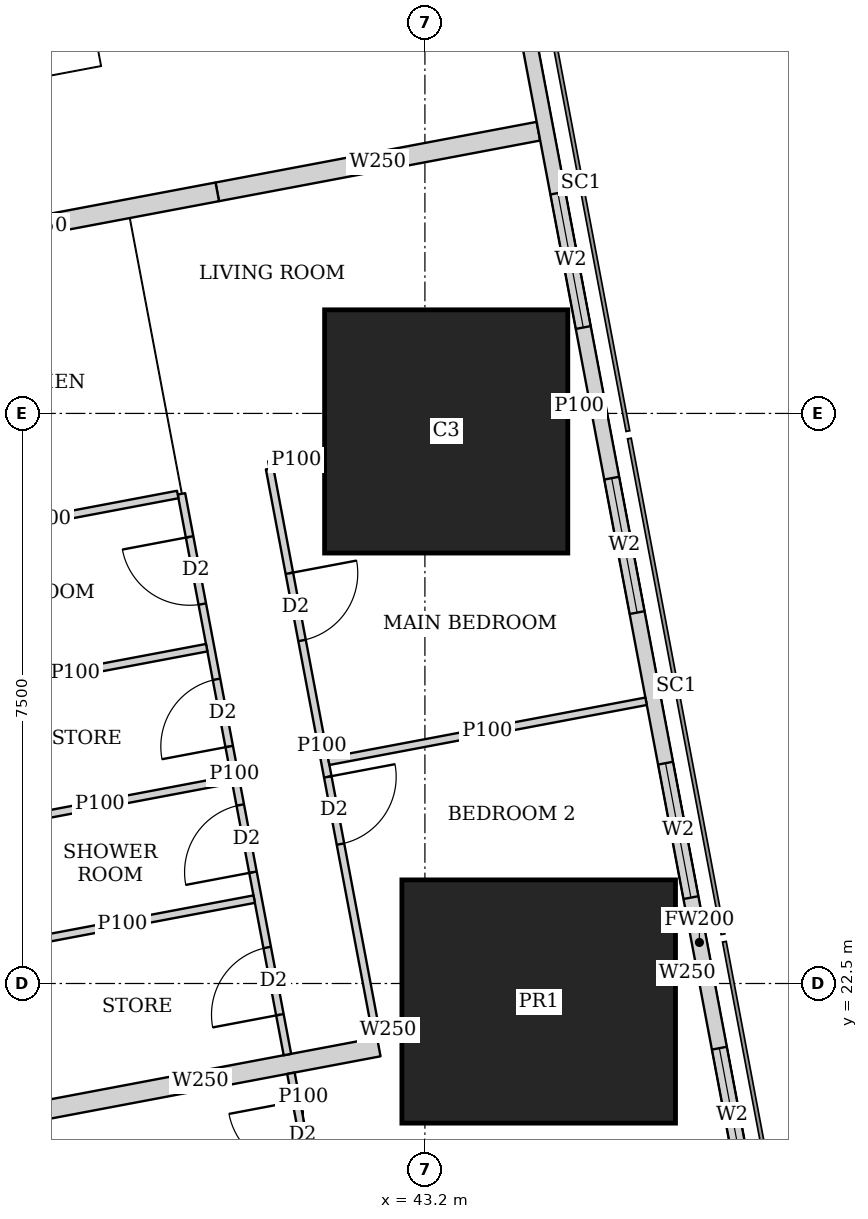
"""IFC4 building model, lengths in metres.
Left out: names, types, materials, properties, quantities, classifications, styles, units other than length and angle.
Written with IfcOpenShell. Run it as: python <this file> out.ifc"""

import sys

from ifc_helpers import new_model, si_unit, direction, frame, frame_2d, origin, origin_2d, place, context, subcontext, project, spatial, rectangle, extrude, element, fill, save


model = new_model("IFC4")
c1 = context("Model", 3, precision=1e-05, world=origin(), true_north=direction((0.0, 1.0)))
c2 = subcontext(c1, "Body", "Model", "MODEL_VIEW")
j1 = project(units=[si_unit("LENGTHUNIT", "METRE"), si_unit("PLANEANGLEUNIT", "RADIAN")], contexts=[c1])
p1 = place(None, origin())
s1 = spatial("IfcSite", under=j1, at=p1, CompositionType="ELEMENT")
p2 = place(p1, origin())
s2 = spatial("IfcBuilding", under=s1, at=p2, CompositionType="ELEMENT")
p3 = place(p2, frame((0.0, 0.0, 20.0)))
s3 = spatial("IfcBuildingStorey", under=s2, at=p3, CompositionType="ELEMENT", Elevation=20.0)
p4 = place(p3, frame((44.697, 22.263, 0.0), z_axis=(0.0, 0.0, 1.0), x_axis=(1.0, 0.0, 0.0)))
e1 = element("IfcColumn", 1, at=p4, inside=s3, PredefinedType="COLUMN", context=c2, shape_type="SweptSolid", body=[
    extrude(rectangle(XDim=3.6, YDim=3.2, at=origin_2d()), origin(), (0.0, 0.0, 1.0), 3.75),
])
p5 = place(p3, frame((43.48, 29.763, 0.0), z_axis=(0.0, 0.0, 1.0), x_axis=(1.0, 0.0, 0.0)))
e2 = element("IfcColumn", 2, at=p5, inside=s3, PredefinedType="COLUMN", context=c2, shape_type="SweptSolid", body=[
    extrude(rectangle(XDim=3.2, YDim=3.2, at=origin_2d()), origin(), (0.0, 0.0, 1.0), 3.75),
])
p6 = place(p3, frame((50.653, 2.703, 0.0), z_axis=(0.0, 0.0, 1.0), x_axis=(-0.185612026696, 0.982623109613, 0.0)))
e3 = element("IfcWall", 3, at=p6, inside=s3, PredefinedType="SOLIDWALL", context=c2, shape_type="SweptSolid", body=[
    extrude(rectangle(XDim=41.393, YDim=0.2, at=frame_2d((20.697, 0.0))), origin(), (0.0, 0.0, 1.0), 3.5),
])
p7 = place(p6, frame((1.633, 0.0, 0.9)))
e4 = element("IfcOpeningElement", 4, at=p7, cuts=e3, PredefinedType="OPENING", context=c2, shape_type="SweptSolid", body=[
    extrude(rectangle(XDim=1.8, YDim=1.5, at=frame_2d((0.9, 0.75))), frame((0.0, 0.11, 0.0), z_axis=(0.0, -1.0, 0.0), x_axis=(1.0, 0.0, 0.0)), (0.0, 0.0, 1.0), 0.22),
])
p8 = place(p6, frame((6.032, 0.0, 0.9)))
e5 = element("IfcOpeningElement", 5, at=p8, cuts=e3, PredefinedType="OPENING", context=c2, shape_type="SweptSolid", body=[
    extrude(rectangle(XDim=1.8, YDim=1.5, at=frame_2d((0.9, 0.75))), frame((0.0, 0.11, 0.0), z_axis=(0.0, -1.0, 0.0), x_axis=(1.0, 0.0, 0.0)), (0.0, 0.0, 1.0), 0.22),
])
p9 = place(p6, frame((9.848, 0.0, 0.9)))
e6 = element("IfcOpeningElement", 6, at=p9, cuts=e3, PredefinedType="OPENING", context=c2, shape_type="SweptSolid", body=[
    extrude(rectangle(XDim=1.8, YDim=1.5, at=frame_2d((0.9, 0.75))), frame((0.0, 0.11, 0.0), z_axis=(0.0, -1.0, 0.0), x_axis=(1.0, 0.0, 0.0)), (0.0, 0.0, 1.0), 0.22),
])
p10 = place(p6, frame((17.481, 0.0, 0.9)))
e7 = element("IfcOpeningElement", 7, at=p10, cuts=e3, PredefinedType="OPENING", context=c2, shape_type="SweptSolid", body=[
    extrude(rectangle(XDim=1.8, YDim=1.5, at=frame_2d((0.9, 0.75))), frame((0.0, 0.11, 0.0), z_axis=(0.0, -1.0, 0.0), x_axis=(1.0, 0.0, 0.0)), (0.0, 0.0, 1.0), 0.22),
])
p11 = place(p6, frame((21.297, 0.0, 0.9)))
e8 = element("IfcOpeningElement", 8, at=p11, cuts=e3, PredefinedType="OPENING", context=c2, shape_type="SweptSolid", body=[
    extrude(rectangle(XDim=1.8, YDim=1.5, at=frame_2d((0.9, 0.75))), frame((0.0, 0.11, 0.0), z_axis=(0.0, -1.0, 0.0), x_axis=(1.0, 0.0, 0.0)), (0.0, 0.0, 1.0), 0.22),
])
p12 = place(p6, frame((25.113, 0.0, 0.9)))
e9 = element("IfcOpeningElement", 9, at=p12, cuts=e3, PredefinedType="OPENING", context=c2, shape_type="SweptSolid", body=[
    extrude(rectangle(XDim=1.8, YDim=1.5, at=frame_2d((0.9, 0.75))), frame((0.0, 0.11, 0.0), z_axis=(0.0, -1.0, 0.0), x_axis=(1.0, 0.0, 0.0)), (0.0, 0.0, 1.0), 0.22),
])
p13 = place(p6, frame((28.93, 0.0, 0.9)))
e10 = element("IfcOpeningElement", 10, at=p13, cuts=e3, PredefinedType="OPENING", context=c2, shape_type="SweptSolid", body=[
    extrude(rectangle(XDim=1.8, YDim=1.5, at=frame_2d((0.9, 0.75))), frame((0.0, 0.11, 0.0), z_axis=(0.0, -1.0, 0.0), x_axis=(1.0, 0.0, 0.0)), (0.0, 0.0, 1.0), 0.22),
])
p14 = place(p6, frame((32.746, 0.0, 0.9)))
e11 = element("IfcOpeningElement", 11, at=p14, cuts=e3, PredefinedType="OPENING", context=c2, shape_type="SweptSolid", body=[
    extrude(rectangle(XDim=1.8, YDim=1.5, at=frame_2d((0.9, 0.75))), frame((0.0, 0.11, 0.0), z_axis=(0.0, -1.0, 0.0), x_axis=(1.0, 0.0, 0.0)), (0.0, 0.0, 1.0), 0.22),
])
p15 = place(p6, frame((36.481, 0.0, 0.9)))
e12 = element("IfcOpeningElement", 12, at=p15, cuts=e3, PredefinedType="OPENING", context=c2, shape_type="SweptSolid", body=[
    extrude(rectangle(XDim=1.8, YDim=1.5, at=frame_2d((0.9, 0.75))), frame((0.0, 0.11, 0.0), z_axis=(0.0, -1.0, 0.0), x_axis=(1.0, 0.0, 0.0)), (0.0, 0.0, 1.0), 0.22),
])
p16 = place(p3, frame((33.755, 42.325, 0.0), z_axis=(0.0, 0.0, 1.0), x_axis=(0.185611461091, -0.982623216453, 0.0)))
e13 = element("IfcWall", 13, at=p16, inside=s3, PredefinedType="SOLIDWALL", context=c2, shape_type="SweptSolid", body=[
    extrude(rectangle(XDim=40.241, YDim=0.15, at=frame_2d((20.121, 0.0))), origin(), (0.0, 0.0, 1.0), 2.5),
])
p17 = place(p16, frame((7.325, 0.0, 0.0)))
e14 = element("IfcOpeningElement", 14, at=p17, cuts=e13, PredefinedType="OPENING", context=c2, shape_type="SweptSolid", body=[
    extrude(rectangle(XDim=1.0, YDim=2.1, at=frame_2d((0.5, 1.05))), frame((0.0, 0.085, 0.0), z_axis=(0.0, -1.0, 0.0), x_axis=(1.0, 0.0, 0.0)), (0.0, 0.0, 1.0), 0.17),
])
p18 = place(p16, frame((11.902, 0.0, 0.0)))
e15 = element("IfcOpeningElement", 15, at=p18, cuts=e13, PredefinedType="OPENING", context=c2, shape_type="SweptSolid", body=[
    extrude(rectangle(XDim=1.0, YDim=2.1, at=frame_2d((0.5, 1.05))), frame((0.0, 0.085, 0.0), z_axis=(0.0, -1.0, 0.0), x_axis=(1.0, 0.0, 0.0)), (0.0, 0.0, 1.0), 0.17),
])
p19 = place(p16, frame((25.718, 0.0, 0.0)))
e16 = element("IfcOpeningElement", 16, at=p19, cuts=e13, PredefinedType="OPENING", context=c2, shape_type="SweptSolid", body=[
    extrude(rectangle(XDim=1.0, YDim=2.1, at=frame_2d((0.5, 1.05))), frame((0.0, 0.085, 0.0), z_axis=(0.0, -1.0, 0.0), x_axis=(1.0, 0.0, 0.0)), (0.0, 0.0, 1.0), 0.17),
])
p20 = place(p16, frame((31.788, 0.0, 0.0)))
e17 = element("IfcOpeningElement", 17, at=p20, cuts=e13, PredefinedType="OPENING", context=c2, shape_type="SweptSolid", body=[
    extrude(rectangle(XDim=1.0, YDim=2.1, at=frame_2d((0.5, 1.05))), frame((0.0, 0.085, 0.0), z_axis=(0.0, -1.0, 0.0), x_axis=(1.0, 0.0, 0.0)), (0.0, 0.0, 1.0), 0.17),
])
p21 = place(p3, frame((41.157, 29.273, 0.0), z_axis=(0.0, 0.0, 1.0), x_axis=(0.18542464283, -0.982658486877, 0.0)))
e18 = element("IfcWall", 18, at=p21, inside=s3, PredefinedType="PARTITIONING", context=c2, shape_type="SweptSolid", body=[
    extrude(rectangle(XDim=7.421, YDim=0.1, at=frame_2d((3.71, 0.0))), origin(), (0.0, 0.0, 1.0), 2.5),
])
p22 = place(p21, frame((1.4, 0.0, 0.0)))
e19 = element("IfcOpeningElement", 19, at=p22, cuts=e18, PredefinedType="OPENING", context=c2, shape_type="SweptSolid", body=[
    extrude(rectangle(XDim=0.9, YDim=2.1, at=frame_2d((0.45, 1.05))), frame((0.0, 0.06, 0.0), z_axis=(0.0, -1.0, 0.0), x_axis=(1.0, 0.0, 0.0)), (0.0, 0.0, 1.0), 0.12),
])
p23 = place(p21, frame((4.126, 0.0, 0.0)))
e20 = element("IfcOpeningElement", 20, at=p23, cuts=e18, PredefinedType="OPENING", context=c2, shape_type="SweptSolid", body=[
    extrude(rectangle(XDim=0.9, YDim=2.1, at=frame_2d((0.45, 1.05))), frame((0.0, 0.06, 0.0), z_axis=(0.0, -1.0, 0.0), x_axis=(1.0, 0.0, 0.0)), (0.0, 0.0, 1.0), 0.12),
])
p24 = place(p3, frame((39.997, 28.942, 0.0), z_axis=(0.0, 0.0, 1.0), x_axis=(0.185686318797, -0.982609073341, 0.0)))
e21 = element("IfcWall", 21, at=p24, inside=s3, PredefinedType="PARTITIONING", context=c2, shape_type="SweptSolid", body=[
    extrude(rectangle(XDim=7.508, YDim=0.1, at=frame_2d((3.754, 0.0))), origin(), (0.0, 0.0, 1.0), 2.5),
])
p25 = place(p24, frame((0.576, 0.0, 0.0)))
e22 = element("IfcOpeningElement", 22, at=p25, cuts=e21, PredefinedType="OPENING", context=c2, shape_type="SweptSolid", body=[
    extrude(rectangle(XDim=0.9, YDim=2.1, at=frame_2d((0.45, 1.05))), frame((0.0, 0.06, 0.0), z_axis=(0.0, -1.0, 0.0), x_axis=(1.0, 0.0, 0.0)), (0.0, 0.0, 1.0), 0.12),
])
p26 = place(p24, frame((4.166, 0.0, 0.0)))
e23 = element("IfcOpeningElement", 23, at=p26, cuts=e21, PredefinedType="OPENING", context=c2, shape_type="SweptSolid", body=[
    extrude(rectangle(XDim=0.9, YDim=2.1, at=frame_2d((0.45, 1.05))), frame((0.0, 0.06, 0.0), z_axis=(0.0, -1.0, 0.0), x_axis=(1.0, 0.0, 0.0)), (0.0, 0.0, 1.0), 0.12),
])
p27 = place(p24, frame((2.483, 0.0, 0.0)))
e24 = element("IfcOpeningElement", 24, at=p27, cuts=e21, PredefinedType="OPENING", context=c2, shape_type="SweptSolid", body=[
    extrude(rectangle(XDim=0.9, YDim=2.1, at=frame_2d((0.45, 1.05))), frame((0.0, 0.06, 0.0), z_axis=(0.0, -1.0, 0.0), x_axis=(1.0, 0.0, 0.0)), (0.0, 0.0, 1.0), 0.12),
])
p28 = place(p24, frame((6.074, 0.0, 0.0)))
e25 = element("IfcOpeningElement", 25, at=p28, cuts=e21, PredefinedType="OPENING", context=c2, shape_type="SweptSolid", body=[
    extrude(rectangle(XDim=0.9, YDim=2.1, at=frame_2d((0.45, 1.05))), frame((0.0, 0.06, 0.0), z_axis=(0.0, -1.0, 0.0), x_axis=(1.0, 0.0, 0.0)), (0.0, 0.0, 1.0), 0.12),
])
p29 = place(p3, frame((45.372, 30.121, 0.0), z_axis=(0.0, 0.0, 1.0), x_axis=(-0.982024635814, -0.188752787143, 0.0)))
e26 = element("IfcWall", 26, at=p29, inside=s3, PredefinedType="PARTITIONING", context=c2, shape_type="SweptSolid", body=[
    extrude(rectangle(XDim=0.287, YDim=0.1, at=frame_2d((0.144, 0.0))), origin(), (0.0, 0.0, 1.0), 3.5),
])
p30 = place(p3, frame((41.87, 29.459, 0.0), z_axis=(0.0, 0.0, 1.0), x_axis=(-0.982532562822, -0.186090738603, 0.0)))
e27 = element("IfcWall", 27, at=p30, inside=s3, PredefinedType="PARTITIONING", context=c2, shape_type="SweptSolid", body=[
    extrude(rectangle(XDim=0.736, YDim=0.1, at=frame_2d((0.368, 0.0))), origin(), (0.0, 0.0, 1.0), 2.5),
])
p31 = place(p3, frame((46.11, 26.213, 0.0), z_axis=(0.0, 0.0, 1.0), x_axis=(-0.982623519589, -0.185609856287, 0.0)))
e28 = element("IfcWall", 28, at=p31, inside=s3, PredefinedType="PARTITIONING", context=c2, shape_type="SweptSolid", body=[
    extrude(rectangle(XDim=4.25, YDim=0.1, at=frame_2d((2.125, 0.0))), origin(), (0.0, 0.0, 1.0), 2.05),
])
for number, where, z_axis, x_axis in (
    (29, (39.948, 28.933, 0.0), (0.0, 0.0, 1.0), (-0.983, -0.186, 0.0)),
    (30, (40.656, 25.183, 0.0), (0.0, 0.0, 1.0), (-0.983, -0.186, 0.0)),
):
    element("IfcWall", number, at=place(p3, frame(where, z_axis=z_axis, x_axis=x_axis)), inside=s3, PredefinedType="PARTITIONING", context=c2, shape_type="SweptSolid", body=[
        extrude(rectangle(XDim=3.524, YDim=0.1, at=frame_2d((1.762, 0.0))), origin(), (0.0, 0.0, 1.0), 3.5),
    ])
p32 = place(p3, frame((40.329, 26.918, 0.0), z_axis=(0.0, 0.0, 1.0), x_axis=(-0.982638553676, -0.185530247748, 0.0)))
e31 = element("IfcWall", 31, at=p32, inside=s3, PredefinedType="PARTITIONING", context=c2, shape_type="SweptSolid", body=[
    extrude(rectangle(XDim=3.525, YDim=0.1, at=frame_2d((1.763, 0.0))), origin(), (0.0, 0.0, 1.0), 3.5),
])
p33 = place(p3, frame((40.954, 23.61, 0.0), z_axis=(0.0, 0.0, 1.0), x_axis=(-0.982638553676, -0.185530247748, 0.0)))
e32 = element("IfcWall", 32, at=p33, inside=s3, PredefinedType="PARTITIONING", context=c2, shape_type="SweptSolid", body=[
    extrude(rectangle(XDim=3.525, YDim=0.1, at=frame_2d((1.763, 0.0))), origin(), (0.0, 0.0, 1.0), 2.5),
])
p34 = place(p3, frame((44.693, 33.713, 0.0), z_axis=(0.0, 0.0, 1.0), x_axis=(-0.982633535512, -0.185556823879, 0.0)))
e33 = element("IfcWall", 33, at=p34, inside=s3, PredefinedType="SOLIDWALL", context=c2, shape_type="SweptSolid", body=[
    extrude(rectangle(XDim=4.3, YDim=0.25, at=frame_2d((2.15, 0.0))), origin(), (0.0, 0.0, 1.0), 2.05),
])
p35 = place(p3, frame((40.468, 32.915, 0.0), z_axis=(0.0, 0.0, 1.0), x_axis=(-0.982635807605, -0.185544791394, 0.0)))
e34 = element("IfcWall", 34, at=p35, inside=s3, PredefinedType="SOLIDWALL", context=c2, shape_type="SweptSolid", body=[
    extrude(rectangle(XDim=4.775, YDim=0.25, at=frame_2d((2.388, 0.0))), origin(), (0.0, 0.0, 1.0), 3.5),
])
p36 = place(p3, frame((41.437, 21.319, 0.0), z_axis=(0.0, 0.0, 1.0), x_axis=(0.185783379659, -0.98259072652, 0.0)))
e35 = element("IfcWall", 35, at=p36, inside=s3, PredefinedType="PARTITIONING", context=c2, shape_type="SweptSolid", body=[
    extrude(rectangle(XDim=1.765, YDim=0.1, at=frame_2d((0.882, 0.0))), origin(), (0.0, 0.0, 1.0), 3.5),
])
p37 = place(p36, frame((0.374, 0.0, 0.0)))
e36 = element("IfcOpeningElement", 36, at=p37, cuts=e35, PredefinedType="OPENING", context=c2, shape_type="SweptSolid", body=[
    extrude(rectangle(XDim=0.9, YDim=2.1, at=frame_2d((0.45, 1.05))), frame((0.0, 0.06, 0.0), z_axis=(0.0, -1.0, 0.0), x_axis=(1.0, 0.0, 0.0)), (0.0, 0.0, 1.0), 0.12),
])
p38 = place(p3, frame((46.782, 22.657, 0.0), z_axis=(0.0, 0.0, 1.0), x_axis=(-0.982104607121, -0.188336243648, 0.0)))
e37 = element("IfcWall", 37, at=p38, inside=s3, PredefinedType="SOLIDWALL", context=c2, shape_type="SweptSolid", body=[
    extrude(rectangle(XDim=0.266, YDim=0.25, at=frame_2d((0.133, 0.0))), origin(), (0.0, 0.0, 1.0), 3.5),
])
p39 = place(p3, frame((42.873, 21.918, 0.0), z_axis=(0.0, 0.0, 1.0), x_axis=(-0.982431406936, -0.186624035603, 0.0)))
e38 = element("IfcWall", 38, at=p39, inside=s3, PredefinedType="SOLIDWALL", context=c2, shape_type="SweptSolid", body=[
    extrude(rectangle(XDim=0.322, YDim=0.25, at=frame_2d((0.161, 0.0))), origin(), (0.0, 0.0, 1.0), 2.5),
])
p40 = place(p3, frame((42.593, 21.665, 0.0), z_axis=(0.0, 0.0, 1.0), x_axis=(-0.982635807605, -0.185544791394, 0.0)))
e39 = element("IfcWall", 39, at=p40, inside=s3, PredefinedType="SOLIDWALL", context=c2, shape_type="SweptSolid", body=[
    extrude(rectangle(XDim=4.775, YDim=0.25, at=frame_2d((2.388, 0.0))), origin(), (0.0, 0.0, 1.0), 2.5),
])
p41 = place(p10, origin())
e40 = element("IfcWindow", 40, at=p41, inside=s3, PartitioningType="SINGLE_PANEL", PredefinedType="WINDOW", context=c2, shape_type="SweptSolid", body=[
    extrude(rectangle(XDim=1.8, YDim=1.5, at=frame_2d((0.9, 0.75))), frame((0.0, 0.03, 0.0), z_axis=(0.0, -1.0, 0.0), x_axis=(1.0, 0.0, 0.0)), (0.0, 0.0, 1.0), 0.06),
])
fill(e7, e40)
p42 = place(p11, origin())
e41 = element("IfcWindow", 41, at=p42, inside=s3, PartitioningType="SINGLE_PANEL", PredefinedType="WINDOW", context=c2, shape_type="SweptSolid", body=[
    extrude(rectangle(XDim=1.8, YDim=1.5, at=frame_2d((0.9, 0.75))), frame((0.0, 0.03, 0.0), z_axis=(0.0, -1.0, 0.0), x_axis=(1.0, 0.0, 0.0)), (0.0, 0.0, 1.0), 0.06),
])
fill(e8, e41)
p43 = place(p12, origin())
e42 = element("IfcWindow", 42, at=p43, inside=s3, PartitioningType="SINGLE_PANEL", PredefinedType="WINDOW", context=c2, shape_type="SweptSolid", body=[
    extrude(rectangle(XDim=1.8, YDim=1.5, at=frame_2d((0.9, 0.75))), frame((0.0, 0.03, 0.0), z_axis=(0.0, -1.0, 0.0), x_axis=(1.0, 0.0, 0.0)), (0.0, 0.0, 1.0), 0.06),
])
fill(e9, e42)
p44 = place(p13, origin())
e43 = element("IfcWindow", 43, at=p44, inside=s3, PartitioningType="SINGLE_PANEL", PredefinedType="WINDOW", context=c2, shape_type="SweptSolid", body=[
    extrude(rectangle(XDim=1.8, YDim=1.5, at=frame_2d((0.9, 0.75))), frame((0.0, 0.03, 0.0), z_axis=(0.0, -1.0, 0.0), x_axis=(1.0, 0.0, 0.0)), (0.0, 0.0, 1.0), 0.06),
])
fill(e10, e43)
p45 = place(p22, origin())
e44 = element("IfcDoor", 44, at=p45, inside=s3, OperationType="SINGLE_SWING_LEFT", PredefinedType="DOOR", context=c2, shape_type="SweptSolid", body=[
    extrude(rectangle(XDim=0.9, YDim=2.1, at=frame_2d((0.45, 1.05))), frame((0.0, 0.025, 0.0), z_axis=(0.0, -1.0, 0.0), x_axis=(1.0, 0.0, 0.0)), (0.0, 0.0, 1.0), 0.05),
])
fill(e19, e44)
p46 = place(p23, origin())
e45 = element("IfcDoor", 45, at=p46, inside=s3, OperationType="SINGLE_SWING_LEFT", PredefinedType="DOOR", context=c2, shape_type="SweptSolid", body=[
    extrude(rectangle(XDim=0.9, YDim=2.1, at=frame_2d((0.45, 1.05))), frame((0.0, 0.025, 0.0), z_axis=(0.0, -1.0, 0.0), x_axis=(1.0, 0.0, 0.0)), (0.0, 0.0, 1.0), 0.05),
])
fill(e20, e45)
p47 = place(p25, origin())
e46 = element("IfcDoor", 46, at=p47, inside=s3, OperationType="SINGLE_SWING_RIGHT", PredefinedType="DOOR", context=c2, shape_type="SweptSolid", body=[
    extrude(rectangle(XDim=0.9, YDim=2.1, at=frame_2d((0.45, 1.05))), frame((0.0, 0.025, 0.0), z_axis=(0.0, -1.0, 0.0), x_axis=(1.0, 0.0, 0.0)), (0.0, 0.0, 1.0), 0.05),
])
fill(e22, e46)
p48 = place(p26, origin())
e47 = element("IfcDoor", 47, at=p48, inside=s3, OperationType="SINGLE_SWING_LEFT", PredefinedType="DOOR", context=c2, shape_type="SweptSolid", body=[
    extrude(rectangle(XDim=0.9, YDim=2.1, at=frame_2d((0.45, 1.05))), frame((0.0, 0.025, 0.0), z_axis=(0.0, -1.0, 0.0), x_axis=(1.0, 0.0, 0.0)), (0.0, 0.0, 1.0), 0.05),
])
fill(e23, e47)
p49 = place(p27, origin())
e48 = element("IfcDoor", 48, at=p49, inside=s3, OperationType="SINGLE_SWING_LEFT", PredefinedType="DOOR", context=c2, shape_type="SweptSolid", body=[
    extrude(rectangle(XDim=0.9, YDim=2.1, at=frame_2d((0.45, 1.05))), frame((0.0, 0.025, 0.0), z_axis=(0.0, -1.0, 0.0), x_axis=(1.0, 0.0, 0.0)), (0.0, 0.0, 1.0), 0.05),
])
fill(e24, e48)
p50 = place(p28, origin())
e49 = element("IfcDoor", 49, at=p50, inside=s3, OperationType="SINGLE_SWING_LEFT", PredefinedType="DOOR", context=c2, shape_type="SweptSolid", body=[
    extrude(rectangle(XDim=0.9, YDim=2.1, at=frame_2d((0.45, 1.05))), frame((0.0, 0.025, 0.0), z_axis=(0.0, -1.0, 0.0), x_axis=(1.0, 0.0, 0.0)), (0.0, 0.0, 1.0), 0.05),
])
fill(e25, e49)
p51 = place(p37, origin())
e50 = element("IfcDoor", 50, at=p51, inside=s3, OperationType="SINGLE_SWING_RIGHT", PredefinedType="DOOR", context=c2, shape_type="SweptSolid", body=[
    extrude(rectangle(XDim=0.9, YDim=2.1, at=frame_2d((0.45, 1.05))), frame((0.0, 0.025, 0.0), z_axis=(0.0, -1.0, 0.0), x_axis=(1.0, 0.0, 0.0)), (0.0, 0.0, 1.0), 0.05),
])
fill(e36, e50)
save(model, sys.argv[1])
